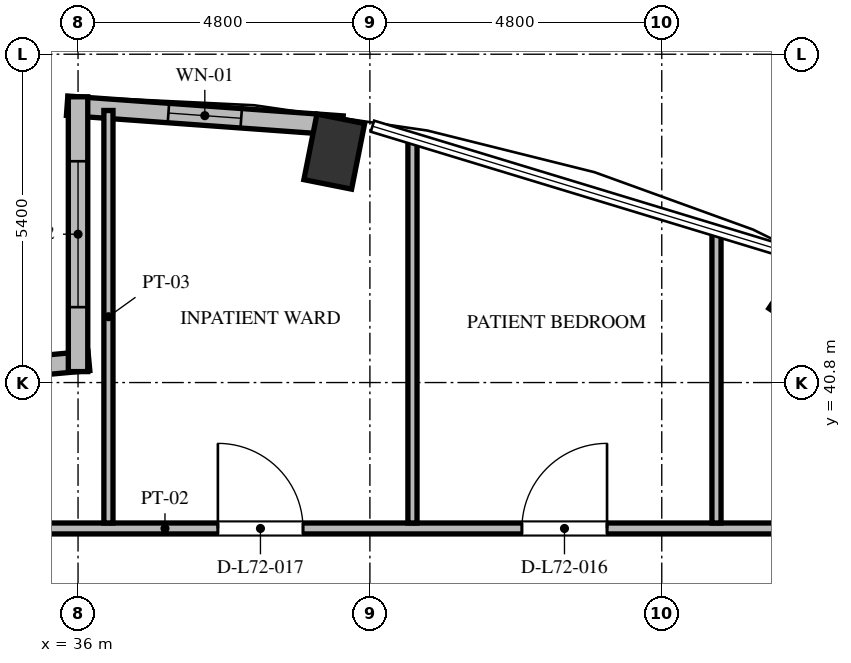
"""IFC4 building model, lengths in metres.
Left out: names, types, materials, properties, quantities, classifications, styles, units other than length and angle.
Written with IfcOpenShell. Run it as: python <this file> out.ifc"""

import sys

from ifc_helpers import new_model, si_unit, direction, frame, frame_2d, origin, origin_2d, place, context, subcontext, project, spatial, rectangle, extrude, element, fill, save


model = new_model("IFC4")
c1 = context("Model", 3, precision=1e-05, world=origin(), true_north=direction((0.0, 1.0)))
c2 = subcontext(c1, "Body", "Model", "MODEL_VIEW")
j1 = project(units=[si_unit("LENGTHUNIT", "METRE"), si_unit("PLANEANGLEUNIT", "RADIAN")], contexts=[c1])
p1 = place(None, origin())
s1 = spatial("IfcSite", under=j1, at=p1, CompositionType="ELEMENT")
p2 = place(p1, origin())
s2 = spatial("IfcBuilding", under=s1, at=p2, CompositionType="ELEMENT")
p3 = place(p2, frame((0.0, 0.0, 276.912)))
s3 = spatial("IfcBuildingStorey", under=s2, at=p3, CompositionType="ELEMENT", Elevation=276.912)
for number, where, z_axis, x_axis in (
    (1, (48.0, 42.254, 0.0), (0.0, 0.0, 1.0), (0.556, 0.831, 0.0)),
    (2, (40.214, 44.598, 0.0), (0.0, 0.0, 1.0), (0.195, 0.981, 0.0)),
):
    element("IfcColumn", number, at=place(p3, frame(where, z_axis=z_axis, x_axis=x_axis)), inside=s3, PredefinedType="COLUMN", context=c2, shape_type="SweptSolid", body=[
        extrude(rectangle(XDim=1.1, YDim=0.8, at=origin_2d()), origin(), (0.0, 0.0, 1.0), 3.648),
    ])
p4 = place(p3, frame((40.35, 45.026, 0.0), z_axis=(0.0, 0.0, 1.0), x_axis=(-0.997412917451, 0.071885131294, 0.0)))
e3 = element("IfcWall", 3, at=p4, inside=s3, PredefinedType="SOLIDWALL", context=c2, shape_type="SweptSolid", body=[
    extrude(rectangle(XDim=4.541, YDim=0.32, at=frame_2d((2.271, 0.0))), origin(), (0.0, 0.0, 1.0), 3.448),
])
p5 = place(p4, frame((1.67, 0.0, 0.85)))
e4 = element("IfcOpeningElement", 4, at=p5, cuts=e3, PredefinedType="OPENING", context=c2, shape_type="SweptSolid", body=[
    extrude(rectangle(XDim=1.2, YDim=2.2, at=frame_2d((0.6, 1.1))), frame((0.0, 0.17, 0.0), z_axis=(0.0, -1.0, 0.0), x_axis=(1.0, 0.0, 0.0)), (0.0, 0.0, 1.0), 0.34),
])
p6 = place(p3, frame((36.179, 41.156, 0.0), z_axis=(0.0, 0.0, 1.0), x_axis=(-0.995736155144, -0.092247001792, 0.0)))
e5 = element("IfcWall", 5, at=p6, inside=s3, PredefinedType="SOLIDWALL", context=c2, shape_type="SweptSolid", body=[
    extrude(rectangle(XDim=3.216, YDim=0.32, at=frame_2d((1.608, 0.0))), origin(), (0.0, 0.0, 1.0), 3.448),
])
p7 = place(p6, frame((1.008, 0.0, 0.85)))
e6 = element("IfcOpeningElement", 6, at=p7, cuts=e5, PredefinedType="OPENING", context=c2, shape_type="SweptSolid", body=[
    extrude(rectangle(XDim=1.2, YDim=1.8, at=frame_2d((0.6, 0.9))), frame((0.0, 0.17, 0.0), z_axis=(0.0, -1.0, 0.0), x_axis=(1.0, 0.0, 0.0)), (0.0, 0.0, 1.0), 0.34),
])
p8 = place(p3, frame((36.0, 45.5, 0.0), z_axis=(0.0, 0.0, 1.0), x_axis=(0.0, -1.0, 0.0)))
e7 = element("IfcWall", 7, at=p8, inside=s3, PredefinedType="SOLIDWALL", context=c2, shape_type="SweptSolid", body=[
    extrude(rectangle(XDim=4.52, YDim=0.32, at=frame_2d((2.26, 0.0))), origin(), (0.0, 0.0, 1.0), 3.448),
])
p9 = place(p8, frame((1.06, 0.0, 0.84)))
e8 = element("IfcOpeningElement", 8, at=p9, cuts=e7, PredefinedType="OPENING", context=c2, shape_type="SweptSolid", body=[
    extrude(rectangle(XDim=2.4, YDim=2.04, at=frame_2d((1.2, 1.02))), frame((0.0, 0.17, 0.0), z_axis=(0.0, -1.0, 0.0), x_axis=(1.0, 0.0, 0.0)), (0.0, 0.0, 1.0), 0.34),
])
p10 = place(p3, frame((32.46, 38.4, 0.0), z_axis=(0.0, 0.0, 1.0), x_axis=(1.0, 0.0, 0.0)))
e9 = element("IfcWall", 9, at=p10, inside=s3, PredefinedType="PARTITIONING", context=c2, shape_type="SweptSolid", body=[
    extrude(rectangle(XDim=19.879, YDim=0.18, at=frame_2d((9.939, 0.0))), origin(), (0.0, 0.0, 1.0), 3.073),
])
p11 = place(p10, frame((16.101, 0.0, 0.0)))
e10 = element("IfcOpeningElement", 10, at=p11, cuts=e9, PredefinedType="OPENING", context=c2, shape_type="SweptSolid", body=[
    extrude(rectangle(XDim=1.4, YDim=2.2, at=frame_2d((0.7, 1.1))), frame((0.0, 0.1, 0.0), z_axis=(0.0, -1.0, 0.0), x_axis=(1.0, 0.0, 0.0)), (0.0, 0.0, 1.0), 0.2),
])
p12 = place(p10, frame((10.84, 0.0, 0.0)))
e11 = element("IfcOpeningElement", 11, at=p12, cuts=e9, PredefinedType="OPENING", context=c2, shape_type="SweptSolid", body=[
    extrude(rectangle(XDim=1.4, YDim=2.2, at=frame_2d((0.7, 1.1))), frame((0.0, 0.1, 0.0), z_axis=(0.0, -1.0, 0.0), x_axis=(1.0, 0.0, 0.0)), (0.0, 0.0, 1.0), 0.2),
])
p13 = place(p10, frame((5.84, 0.0, 0.0)))
e12 = element("IfcOpeningElement", 12, at=p13, cuts=e9, PredefinedType="OPENING", context=c2, shape_type="SweptSolid", body=[
    extrude(rectangle(XDim=1.4, YDim=2.2, at=frame_2d((0.7, 1.1))), frame((0.0, 0.1, 0.0), z_axis=(0.0, -1.0, 0.0), x_axis=(1.0, 0.0, 0.0)), (0.0, 0.0, 1.0), 0.2),
])
p14 = place(p10, frame((1.479, 0.0, 0.0)))
e13 = element("IfcOpeningElement", 13, at=p14, cuts=e9, PredefinedType="OPENING", context=c2, shape_type="SweptSolid", body=[
    extrude(rectangle(XDim=1.4, YDim=2.2, at=frame_2d((0.7, 1.1))), frame((0.0, 0.1, 0.0), z_axis=(0.0, -1.0, 0.0), x_axis=(1.0, 0.0, 0.0)), (0.0, 0.0, 1.0), 0.2),
])
p15 = place(p3, frame((36.5, 38.49, 0.0), z_axis=(0.0, 0.0, 1.0), x_axis=(0.0, 1.0, 0.0)))
e14 = element("IfcWall", 14, at=p15, inside=s3, PredefinedType="PARTITIONING", context=c2, shape_type="SweptSolid", body=[
    extrude(rectangle(XDim=6.785, YDim=0.15, at=frame_2d((3.392, 0.0))), origin(), (0.0, 0.0, 1.0), 3.448),
])
p16 = place(p3, frame((41.5, 38.49, 0.0), z_axis=(0.0, 0.0, 1.0), x_axis=(0.0, 1.0, 0.0)))
e15 = element("IfcWall", 15, at=p16, inside=s3, PredefinedType="PARTITIONING", context=c2, shape_type="SweptSolid", body=[
    extrude(rectangle(XDim=6.31, YDim=0.15, at=frame_2d((3.155, 0.0))), origin(), (0.0, 0.0, 1.0), 3.448),
])
p17 = place(p3, frame((46.5, 38.49, 0.0), z_axis=(0.0, 0.0, 1.0), x_axis=(0.0, 1.0, 0.0)))
e16 = element("IfcWall", 16, at=p17, inside=s3, PredefinedType="PARTITIONING", context=c2, shape_type="SweptSolid", body=[
    extrude(rectangle(XDim=4.791, YDim=0.15, at=frame_2d((2.396, 0.0))), origin(), (0.0, 0.0, 1.0), 3.448),
])
p18 = place(p5, origin())
e17 = element("IfcWindow", 17, at=p18, inside=s3, PartitioningType="SINGLE_PANEL", PredefinedType="WINDOW", context=c2, shape_type="SweptSolid", body=[
    extrude(rectangle(XDim=1.2, YDim=2.2, at=frame_2d((0.6, 1.1))), frame((0.0, 0.03, 0.0), z_axis=(0.0, -1.0, 0.0), x_axis=(1.0, 0.0, 0.0)), (0.0, 0.0, 1.0), 0.06),
])
fill(e4, e17)
p19 = place(p9, origin())
e18 = element("IfcWindow", 18, at=p19, inside=s3, PartitioningType="SINGLE_PANEL", PredefinedType="WINDOW", context=c2, shape_type="SweptSolid", body=[
    extrude(rectangle(XDim=2.4, YDim=2.04, at=frame_2d((1.2, 1.02))), frame((0.0, 0.03, 0.0), z_axis=(0.0, -1.0, 0.0), x_axis=(1.0, 0.0, 0.0)), (0.0, 0.0, 1.0), 0.06),
])
fill(e8, e18)
p20 = place(p12, origin())
e19 = element("IfcDoor", 19, at=p20, inside=s3, OperationType="SINGLE_SWING_RIGHT", PredefinedType="DOOR", context=c2, shape_type="SweptSolid", body=[
    extrude(rectangle(XDim=1.4, YDim=2.2, at=frame_2d((0.7, 1.1))), frame((0.0, 0.025, 0.0), z_axis=(0.0, -1.0, 0.0), x_axis=(1.0, 0.0, 0.0)), (0.0, 0.0, 1.0), 0.05),
])
fill(e11, e19)
p21 = place(p13, origin())
e20 = element("IfcDoor", 20, at=p21, inside=s3, OperationType="SINGLE_SWING_LEFT", PredefinedType="DOOR", context=c2, shape_type="SweptSolid", body=[
    extrude(rectangle(XDim=1.4, YDim=2.2, at=frame_2d((0.7, 1.1))), frame((0.0, 0.025, 0.0), z_axis=(0.0, -1.0, 0.0), x_axis=(1.0, 0.0, 0.0)), (0.0, 0.0, 1.0), 0.05),
])
fill(e12, e20)
save(model, sys.argv[1])
